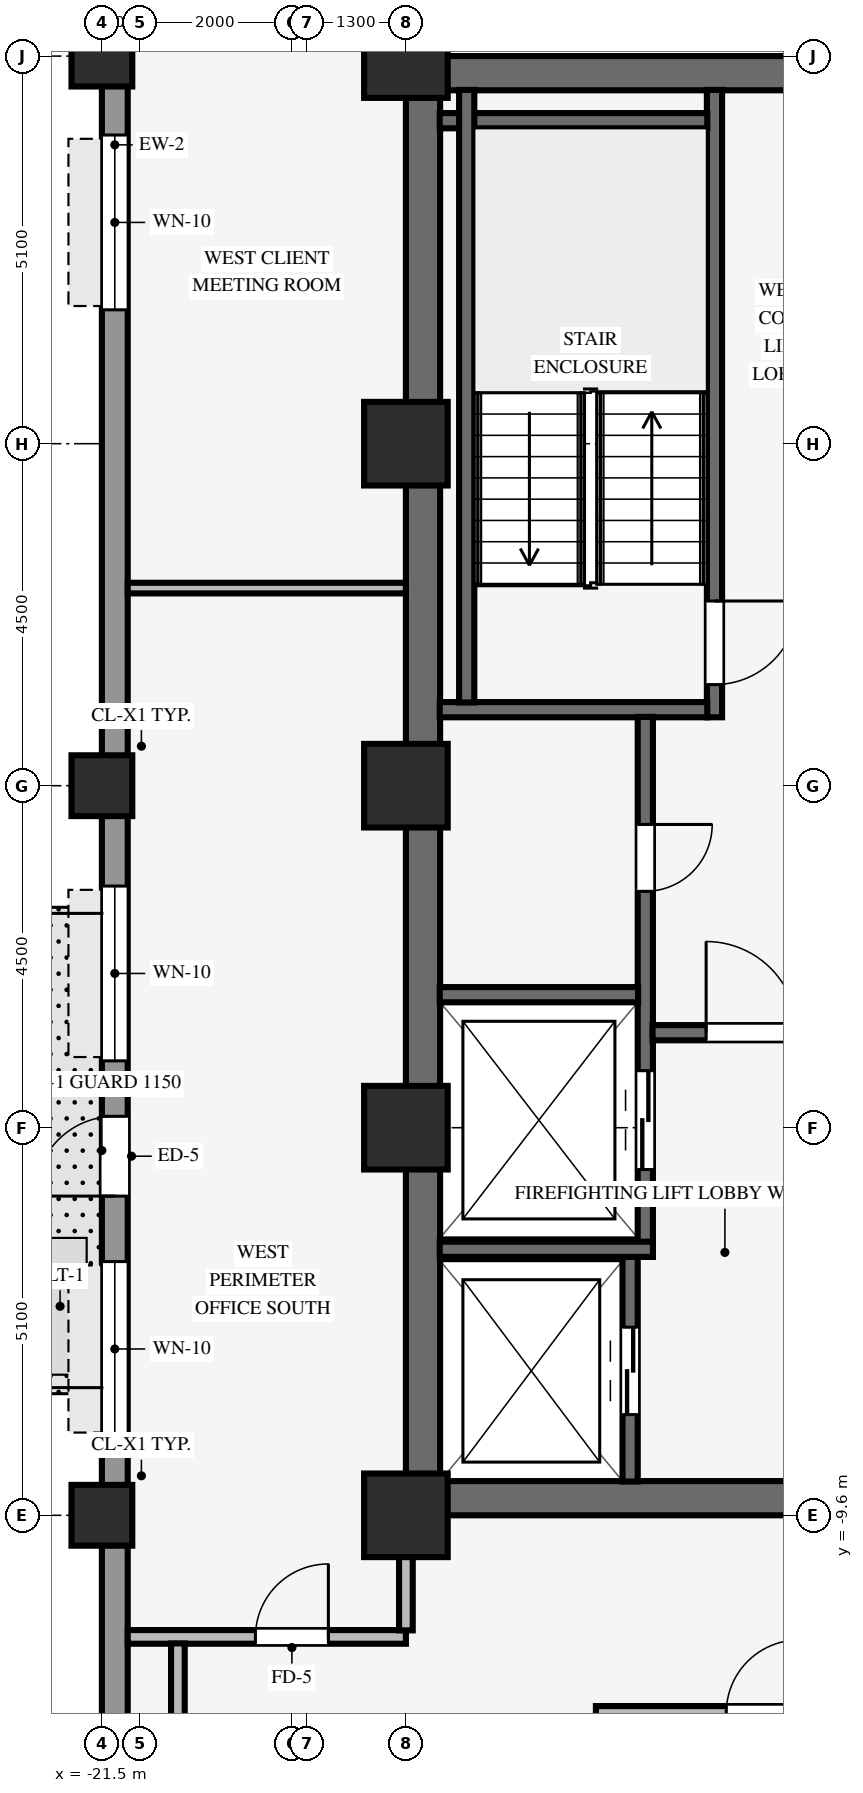
"""IFC4 building model, lengths in metres.
Left out: names, types, materials, properties, quantities, classifications, styles, units other than length and angle.
Written with IfcOpenShell. Run it as: python <this file> out.ifc"""

import sys

from ifc_helpers import new_model, si_unit, direction, frame, frame_2d, origin, origin_2d, place, context, subcontext, project, spatial, rectangle, hollow_rectangle, extrude, source, transform, mapped, element, fill, save


model = new_model("IFC4")
c1 = context("Model", 3, precision=1e-05, world=origin(), true_north=direction((0.0, 1.0)))
c2 = subcontext(c1, "Body", "Model", "MODEL_VIEW")
j1 = project(units=[si_unit("LENGTHUNIT", "METRE"), si_unit("PLANEANGLEUNIT", "RADIAN")], contexts=[c1])
p1 = place(None, origin())
s1 = spatial("IfcSite", under=j1, at=p1, CompositionType="ELEMENT")
p2 = place(p1, origin())
s2 = spatial("IfcBuilding", under=s1, at=p2, CompositionType="ELEMENT")
p3 = place(p2, frame((0.0, 0.0, 64.1)))
s3 = spatial("IfcBuildingStorey", under=s2, at=p3, CompositionType="ELEMENT", Elevation=64.1)
for number, where, z_axis, x_axis in (
    (1, (-17.5, -9.375, 0.0), (0.0, 0.0, 1.0), (1.0, 0.0, 0.0)),
    (2, (-17.5, 9.375, 0.0), (0.0, 0.0, 1.0), (1.0, 0.0, 0.0)),
):
    element("IfcWall", number, at=place(p3, frame(where, z_axis=z_axis, x_axis=x_axis)), inside=s3, PredefinedType="SHEAR", context=c2, shape_type="SweptSolid", body=[
        extrude(rectangle(XDim=8.5, YDim=0.45, at=frame_2d((4.25, 0.0))), origin(), (0.0, 0.0, 1.0), 3.37),
    ])
p4 = place(p3, frame((-17.275, -9.155, 0.0), z_axis=(0.0, 0.0, 1.0), x_axis=(0.0, 1.0, 0.0)))
e3 = element("IfcWall", 3, at=p4, inside=s3, PredefinedType="SHEAR", context=c2, shape_type="SweptSolid", body=[
    extrude(rectangle(XDim=18.31, YDim=0.45, at=frame_2d((9.155, 0.0))), origin(), (0.0, 0.0, 1.0), 3.37),
])
for number, where, z_axis, x_axis in (
    (4, (-17.5, -9.6, 0.0), (0.0, 0.0, 1.0), (1.0, 0.0, 0.0)),
    (5, (-17.5, -4.5, 0.0), (0.0, 0.0, 1.0), (1.0, 0.0, 0.0)),
    (6, (-17.5, 4.5, 0.0), (0.0, 0.0, 1.0), (1.0, 0.0, 0.0)),
    (7, (-17.5, 9.6, 0.0), (0.0, 0.0, 1.0), (1.0, 0.0, 0.0)),
    (8, (-17.5, 0.0, 0.0), (0.0, 0.0, 1.0), (1.0, 0.0, 0.0)),
):
    element("IfcColumn", number, at=place(p3, frame(where, z_axis=z_axis, x_axis=x_axis)), inside=s3, PredefinedType="COLUMN", context=c2, shape_type="SweptSolid", body=[
        extrude(rectangle(XDim=1.1, YDim=1.1, at=origin_2d()), origin(), (0.0, 0.0, 1.0), 3.37),
    ])
for number, where, z_axis, x_axis in (
    (9, (-21.5, -9.6, 0.0), (0.0, 0.0, 1.0), (1.0, 0.0, 0.0)),
    (10, (-21.5, 0.0, 0.0), (0.0, 0.0, 1.0), (1.0, 0.0, 0.0)),
    (11, (-21.5, 9.6, 0.0), (0.0, 0.0, 1.0), (1.0, 0.0, 0.0)),
):
    element("IfcColumn", number, at=place(p3, frame(where, z_axis=z_axis, x_axis=x_axis)), inside=s3, PredefinedType="COLUMN", context=c2, shape_type="SweptSolid", body=[
        extrude(hollow_rectangle(XDim=0.8, YDim=0.8, WallThickness=0.055, InnerFilletRadius=0.055, OuterFilletRadius=0.11, at=origin_2d()), origin(), (0.0, 0.0, 1.0), 3.37),
    ])
p5 = place(p3, frame((-21.33, -20.764, 0.0), z_axis=(0.0, 0.0, 1.0), x_axis=(0.0, 1.0, 0.0)))
e12 = element("IfcWall", 12, at=p5, inside=s3, PredefinedType="STANDARD", context=c2, shape_type="SweptSolid", body=[
    extrude(rectangle(XDim=41.528, YDim=0.34, at=frame_2d((20.764, 0.0))), origin(), (0.0, 0.0, 1.0), 2.705),
])
p6 = place(p5, frame((15.364, 0.0, 0.0)))
e13 = element("IfcOpeningElement", 13, at=p6, cuts=e12, PredefinedType="OPENING", context=c2, shape_type="SweptSolid", body=[
    extrude(rectangle(XDim=1.05, YDim=2.1, at=frame_2d((0.525, 1.05))), frame((0.0, 0.18, 0.0), z_axis=(0.0, -1.0, 0.0), x_axis=(1.0, 0.0, 0.0)), (0.0, 0.0, 1.0), 0.36),
])
p7 = place(p5, frame((12.202, 0.0, 0.8)))
e14 = element("IfcOpeningElement", 14, at=p7, cuts=e12, PredefinedType="OPENING", context=c2, shape_type="SweptSolid", body=[
    extrude(rectangle(XDim=2.3, YDim=1.62, at=frame_2d((1.15, 0.81))), frame((0.0, 0.18, 0.0), z_axis=(0.0, -1.0, 0.0), x_axis=(1.0, 0.0, 0.0)), (0.0, 0.0, 1.0), 0.36),
])
p8 = place(p5, frame((17.144, 0.0, 0.8)))
e15 = element("IfcOpeningElement", 15, at=p8, cuts=e12, PredefinedType="OPENING", context=c2, shape_type="SweptSolid", body=[
    extrude(rectangle(XDim=2.3, YDim=1.62, at=frame_2d((1.15, 0.81))), frame((0.0, 0.18, 0.0), z_axis=(0.0, -1.0, 0.0), x_axis=(1.0, 0.0, 0.0)), (0.0, 0.0, 1.0), 0.36),
])
p9 = place(p5, frame((27.025, 0.0, 0.8)))
e16 = element("IfcOpeningElement", 16, at=p9, cuts=e12, PredefinedType="OPENING", context=c2, shape_type="SweptSolid", body=[
    extrude(rectangle(XDim=2.3, YDim=1.62, at=frame_2d((1.15, 0.81))), frame((0.0, 0.18, 0.0), z_axis=(0.0, -1.0, 0.0), x_axis=(1.0, 0.0, 0.0)), (0.0, 0.0, 1.0), 0.36),
])
p10 = place(p3, frame((-13.44, 0.9, 0.0), z_axis=(0.0, 0.0, 1.0), x_axis=(0.0, 1.0, 0.0)))
e17 = element("IfcWall", 17, at=p10, inside=s3, PredefinedType="SHEAR", context=c2, shape_type="SweptSolid", body=[
    extrude(rectangle(XDim=8.255, YDim=0.2, at=frame_2d((4.127, 0.0))), origin(), (0.0, 0.0, 1.0), 3.37),
])
p11 = place(p10, frame((1.53, 0.0, 0.0), z_axis=(0.0, 0.0, 1.0), x_axis=(-1.0, 0.0, 0.0)))
e18 = element("IfcOpeningElement", 18, at=p11, cuts=e17, PredefinedType="OPENING", context=c2, shape_type="SweptSolid", body=[
    extrude(rectangle(XDim=1.1, YDim=2.15, at=frame_2d((0.55, 1.075))), frame((0.0, 0.11, 0.0), z_axis=(0.0, -1.0, 0.0), x_axis=(1.0, 0.0, 0.0)), (0.0, 0.0, 1.0), 0.22),
])
for number, where, z_axis, x_axis in (
    (19, (-17.055, 1.0, 0.0), (0.0, 0.0, 1.0), (1.0, 0.0, 0.0)),
    (20, (-17.055, 8.75, 0.0), (0.0, 0.0, 1.0), (1.0, 0.0, 0.0)),
):
    element("IfcWall", number, at=place(p3, frame(where, z_axis=z_axis, x_axis=x_axis)), inside=s3, PredefinedType="SHEAR", context=c2, shape_type="SweptSolid", body=[
        extrude(rectangle(XDim=3.52, YDim=0.2, at=frame_2d((1.76, 0.0))), origin(), (0.0, 0.0, 1.0), 3.37),
    ])
p12 = place(p3, frame((-16.7, 1.095, 0.0), z_axis=(0.0, 0.0, 1.0), x_axis=(0.0, 1.0, 0.0)))
e21 = element("IfcWall", 21, at=p12, inside=s3, PredefinedType="SHEAR", context=c2, shape_type="SweptSolid", body=[
    extrude(rectangle(XDim=8.06, YDim=0.2, at=frame_2d((4.03, 0.0))), origin(), (0.0, 0.0, 1.0), 3.37),
])
p13 = place(p3, frame((-14.55, -9.155, 0.0), z_axis=(0.0, 0.0, 1.0), x_axis=(0.0, 1.0, 0.0)))
e22 = element("IfcWall", 22, at=p13, inside=s3, PredefinedType="SHEAR", context=c2, shape_type="SweptSolid", body=[
    extrude(rectangle(XDim=2.96, YDim=0.2, at=frame_2d((1.48, 0.0))), origin(), (0.0, 0.0, 1.0), 3.37),
])
p14 = place(p13, frame((0.88, 0.0, 0.0)))
e23 = element("IfcOpeningElement", 23, at=p14, cuts=e22, PredefinedType="OPENING", context=c2, shape_type="SweptSolid", body=[
    extrude(rectangle(XDim=1.15, YDim=2.15, at=frame_2d((0.575, 1.075))), frame((0.0, 0.11, 0.0), z_axis=(0.0, -1.0, 0.0), x_axis=(1.0, 0.0, 0.0)), (0.0, 0.0, 1.0), 0.22),
])
p15 = place(p3, frame((-14.35, -6.2, 0.0), z_axis=(0.0, 0.0, 1.0), x_axis=(0.0, 1.0, 0.0)))
e24 = element("IfcWall", 24, at=p15, inside=s3, PredefinedType="SHEAR", context=c2, shape_type="SweptSolid", body=[
    extrude(rectangle(XDim=7.105, YDim=0.2, at=frame_2d((3.552, 0.0))), origin(), (0.0, 0.0, 1.0), 3.37),
])
p16 = place(p15, frame((5.69, 0.0, 0.0), z_axis=(0.0, 0.0, 1.0), x_axis=(-1.0, 0.0, 0.0)))
e25 = element("IfcOpeningElement", 25, at=p16, cuts=e24, PredefinedType="OPENING", context=c2, shape_type="SweptSolid", body=[
    extrude(rectangle(XDim=0.88, YDim=2.1, at=frame_2d((0.44, 1.05))), frame((0.0, 0.11, 0.0), z_axis=(0.0, -1.0, 0.0), x_axis=(1.0, 0.0, 0.0)), (0.0, 0.0, 1.0), 0.22),
])
p17 = place(p15, frame((1.15, 0.0, 0.0)))
e26 = element("IfcOpeningElement", 26, at=p17, cuts=e24, PredefinedType="OPENING", context=c2, shape_type="SweptSolid", body=[
    extrude(rectangle(XDim=1.3, YDim=2.2, at=frame_2d((0.65, 1.1))), frame((0.0, 0.11, 0.0), z_axis=(0.0, -1.0, 0.0), x_axis=(1.0, 0.0, 0.0)), (0.0, 0.0, 1.0), 0.22),
])
p18 = place(p3, frame((-17.055, -6.1, 0.0), z_axis=(0.0, 0.0, 1.0), x_axis=(1.0, 0.0, 0.0)))
e27 = element("IfcWall", 27, at=p18, inside=s3, PredefinedType="SHEAR", context=c2, shape_type="SweptSolid", body=[
    extrude(rectangle(XDim=2.805, YDim=0.2, at=frame_2d((1.402, 0.0))), origin(), (0.0, 0.0, 1.0), 3.37),
])
p19 = place(p3, frame((-17.055, -2.75, 0.0), z_axis=(0.0, 0.0, 1.0), x_axis=(1.0, 0.0, 0.0)))
e28 = element("IfcWall", 28, at=p19, inside=s3, PredefinedType="SHEAR", context=c2, shape_type="SweptSolid", body=[
    extrude(rectangle(XDim=2.61, YDim=0.2, at=frame_2d((1.305, 0.0))), origin(), (0.0, 0.0, 1.0), 3.37),
])
p20 = place(p3, frame((-14.255, -3.25, 0.0), z_axis=(0.0, 0.0, 1.0), x_axis=(1.0, 0.0, 0.0)))
e29 = element("IfcWall", 29, at=p20, inside=s3, PredefinedType="SHEAR", context=c2, shape_type="SweptSolid", body=[
    extrude(rectangle(XDim=2.56, YDim=0.2, at=frame_2d((1.28, 0.0))), origin(), (0.0, 0.0, 1.0), 3.37),
])
p21 = place(p20, frame((0.705, 0.0, 0.0)))
e30 = element("IfcOpeningElement", 30, at=p21, cuts=e29, PredefinedType="OPENING", context=c2, shape_type="SweptSolid", body=[
    extrude(rectangle(XDim=1.2, YDim=2.15, at=frame_2d((0.6, 1.075))), frame((0.0, 0.11, 0.0), z_axis=(0.0, -1.0, 0.0), x_axis=(1.0, 0.0, 0.0)), (0.0, 0.0, 1.0), 0.22),
])
p22 = place(p3, frame((-15.0, -12.2, 0.0), z_axis=(0.0, 0.0, 1.0), x_axis=(1.0, 0.0, 0.0)))
e31 = element("IfcWall", 31, at=p22, inside=s3, PredefinedType="PARTITIONING", context=c2, shape_type="SweptSolid", body=[
    extrude(rectangle(XDim=23.8, YDim=0.18, at=frame_2d((11.9, 0.0))), origin(), (0.0, 0.0, 1.0), 3.36),
])
p23 = place(p22, frame((9.31, 0.0, 0.0)))
e32 = element("IfcOpeningElement", 32, at=p23, cuts=e31, PredefinedType="OPENING", context=c2, shape_type="SweptSolid", body=[
    extrude(rectangle(XDim=0.96, YDim=2.1, at=frame_2d((0.48, 1.05))), frame((0.0, 0.1, 0.0), z_axis=(0.0, -1.0, 0.0), x_axis=(1.0, 0.0, 0.0)), (0.0, 0.0, 1.0), 0.2),
])
p24 = place(p22, frame((1.715, 0.0, 0.0)))
e33 = element("IfcOpeningElement", 33, at=p24, cuts=e31, PredefinedType="OPENING", context=c2, shape_type="SweptSolid", body=[
    extrude(rectangle(XDim=0.96, YDim=2.1, at=frame_2d((0.48, 1.05))), frame((0.0, 0.1, 0.0), z_axis=(0.0, -1.0, 0.0), x_axis=(1.0, 0.0, 0.0)), (0.0, 0.0, 1.0), 0.2),
])
p25 = place(p22, frame((5.44, 0.0, 0.0)))
e34 = element("IfcOpeningElement", 34, at=p25, cuts=e31, PredefinedType="OPENING", context=c2, shape_type="SweptSolid", body=[
    extrude(rectangle(XDim=0.96, YDim=2.1, at=frame_2d((0.48, 1.05))), frame((0.0, 0.1, 0.0), z_axis=(0.0, -1.0, 0.0), x_axis=(1.0, 0.0, 0.0)), (0.0, 0.0, 1.0), 0.2),
])
p26 = place(p22, frame((19.65, 0.0, 0.0)))
e35 = element("IfcOpeningElement", 35, at=p26, cuts=e31, PredefinedType="OPENING", context=c2, shape_type="SweptSolid", body=[
    extrude(rectangle(XDim=0.9, YDim=2.1, at=frame_2d((0.45, 1.05))), frame((0.0, 0.1, 0.0), z_axis=(0.0, -1.0, 0.0), x_axis=(1.0, 0.0, 0.0)), (0.0, 0.0, 1.0), 0.2),
])
p27 = place(p22, frame((17.05, 0.0, 0.0)))
e36 = element("IfcOpeningElement", 36, at=p27, cuts=e31, PredefinedType="OPENING", context=c2, shape_type="SweptSolid", body=[
    extrude(rectangle(XDim=0.9, YDim=2.1, at=frame_2d((0.45, 1.05))), frame((0.0, 0.1, 0.0), z_axis=(0.0, -1.0, 0.0), x_axis=(1.0, 0.0, 0.0)), (0.0, 0.0, 1.0), 0.2),
])
p28 = place(p22, frame((22.15, 0.0, 0.0)))
e37 = element("IfcOpeningElement", 37, at=p28, cuts=e31, PredefinedType="OPENING", context=c2, shape_type="SweptSolid", body=[
    extrude(rectangle(XDim=0.9, YDim=2.1, at=frame_2d((0.45, 1.05))), frame((0.0, 0.1, 0.0), z_axis=(0.0, -1.0, 0.0), x_axis=(1.0, 0.0, 0.0)), (0.0, 0.0, 1.0), 0.2),
])
p29 = place(p22, frame((14.72, 0.0, 0.0)))
e38 = element("IfcOpeningElement", 38, at=p29, cuts=e31, PredefinedType="OPENING", context=c2, shape_type="SweptSolid", body=[
    extrude(rectangle(XDim=0.96, YDim=2.1, at=frame_2d((0.48, 1.05))), frame((0.0, 0.1, 0.0), z_axis=(0.0, -1.0, 0.0), x_axis=(1.0, 0.0, 0.0)), (0.0, 0.0, 1.0), 0.2),
])
p30 = place(p3, frame((-21.16, -11.2, 0.0), z_axis=(0.0, 0.0, 1.0), x_axis=(1.0, 0.0, 0.0)))
e39 = element("IfcWall", 39, at=p30, inside=s3, PredefinedType="PARTITIONING", context=c2, shape_type="SweptSolid", body=[
    extrude(rectangle(XDim=3.66, YDim=0.18, at=frame_2d((1.83, 0.0))), origin(), (0.0, 0.0, 1.0), 3.36),
])
p31 = place(p30, frame((1.68, 0.0, 0.0)))
e40 = element("IfcOpeningElement", 40, at=p31, cuts=e39, PredefinedType="OPENING", context=c2, shape_type="SweptSolid", body=[
    extrude(rectangle(XDim=0.96, YDim=2.1, at=frame_2d((0.48, 1.05))), frame((0.0, 0.1, 0.0), z_axis=(0.0, -1.0, 0.0), x_axis=(1.0, 0.0, 0.0)), (0.0, 0.0, 1.0), 0.2),
])
p32 = place(p3, frame((-21.16, 2.6, 0.0), z_axis=(0.0, 0.0, 1.0), x_axis=(1.0, 0.0, 0.0)))
e41 = element("IfcWall", 41, at=p32, inside=s3, PredefinedType="PARTITIONING", context=c2, shape_type="SweptSolid", body=[
    extrude(rectangle(XDim=3.66, YDim=0.14, at=frame_2d((1.83, 0.0))), origin(), (0.0, 0.0, 1.0), 3.36),
])
p33 = place(p3, frame((-20.5, -13.514, 0.0), z_axis=(0.0, 0.0, 1.0), x_axis=(0.0, 1.0, 0.0)))
e42 = element("IfcWall", 42, at=p33, inside=s3, PredefinedType="PARTITIONING", context=c2, shape_type="SweptSolid", body=[
    extrude(rectangle(XDim=2.228, YDim=0.18, at=frame_2d((1.114, 0.0))), origin(), (0.0, 0.0, 1.0), 3.36),
])
p34 = place(p3, frame((-17.5, -11.114, 0.0), z_axis=(0.0, 0.0, 1.0), x_axis=(0.0, 1.0, 0.0)))
e43 = element("IfcWall", 43, at=p34, inside=s3, PredefinedType="PARTITIONING", context=c2, shape_type="SweptSolid", body=[
    extrude(rectangle(XDim=0.968, YDim=0.18, at=frame_2d((0.484, 0.0))), origin(), (0.0, 0.0, 1.0), 2.738),
])
m1 = source(origin(), c2, "Body", "SweptSolid", [
    extrude(rectangle(XDim=1.05, YDim=2.1, at=frame_2d((0.525, 1.05))), frame((0.0, 0.025, 0.0), z_axis=(0.0, -1.0, 0.0), x_axis=(1.0, 0.0, 0.0)), (0.0, 0.0, 1.0), 0.05),
])
p35 = place(p6, origin())
e44 = element("IfcDoor", 44, at=p35, inside=s3, OperationType="SINGLE_SWING_LEFT", PredefinedType="DOOR", context=c2, shape_type="MappedRepresentation", body=[
    mapped(m1, transform((0.0, 0.0, 0.0), scale=1.0)),
])
fill(e13, e44)
m2 = source(origin(), c2, "Body", "SweptSolid", [
    extrude(rectangle(XDim=2.3, YDim=1.62, at=frame_2d((1.15, 0.81))), frame((0.0, 0.03, 0.0), z_axis=(0.0, -1.0, 0.0), x_axis=(1.0, 0.0, 0.0)), (0.0, 0.0, 1.0), 0.06),
])
p36 = place(p7, origin())
e45 = element("IfcWindow", 45, at=p36, inside=s3, PartitioningType="SINGLE_PANEL", PredefinedType="WINDOW", context=c2, shape_type="MappedRepresentation", body=[
    mapped(m2, transform((0.0, 0.0, 0.0), scale=1.0)),
])
fill(e14, e45)
p37 = place(p8, origin())
e46 = element("IfcWindow", 46, at=p37, inside=s3, PartitioningType="SINGLE_PANEL", PredefinedType="WINDOW", context=c2, shape_type="MappedRepresentation", body=[
    mapped(m2, transform((0.0, 0.0, 0.0), scale=1.0)),
])
fill(e15, e46)
p38 = place(p9, origin())
e47 = element("IfcWindow", 47, at=p38, inside=s3, PartitioningType="SINGLE_PANEL", PredefinedType="WINDOW", context=c2, shape_type="MappedRepresentation", body=[
    mapped(m2, transform((0.0, 0.0, 0.0), scale=1.0)),
])
fill(e16, e47)
m3 = source(origin(), c2, "Body", "SweptSolid", [
    extrude(rectangle(XDim=1.1, YDim=2.15, at=frame_2d((0.55, 1.075))), frame((0.0, 0.025, 0.0), z_axis=(0.0, -1.0, 0.0), x_axis=(1.0, 0.0, 0.0)), (0.0, 0.0, 1.0), 0.05),
])
p39 = place(p11, origin())
e48 = element("IfcDoor", 48, at=p39, inside=s3, OperationType="SINGLE_SWING_LEFT", PredefinedType="DOOR", context=c2, shape_type="MappedRepresentation", body=[
    mapped(m3, transform((0.0, 0.0, 0.0), scale=1.0)),
])
fill(e18, e48)
m4 = source(origin(), c2, "Body", "SweptSolid", [
    extrude(rectangle(XDim=0.88, YDim=2.1, at=frame_2d((0.44, 1.05))), frame((0.0, 0.025, 0.0), z_axis=(0.0, -1.0, 0.0), x_axis=(1.0, 0.0, 0.0)), (0.0, 0.0, 1.0), 0.05),
])
p40 = place(p16, origin())
e49 = element("IfcDoor", 49, at=p40, inside=s3, OperationType="SINGLE_SWING_LEFT", PredefinedType="DOOR", context=c2, shape_type="MappedRepresentation", body=[
    mapped(m4, transform((0.0, 0.0, 0.0), scale=1.0)),
])
fill(e25, e49)
m5 = source(origin(), c2, "Body", "SweptSolid", [
    extrude(rectangle(XDim=1.2, YDim=2.15, at=frame_2d((0.6, 1.075))), frame((0.0, 0.025, 0.0), z_axis=(0.0, -1.0, 0.0), x_axis=(1.0, 0.0, 0.0)), (0.0, 0.0, 1.0), 0.05),
])
p41 = place(p21, origin())
e50 = element("IfcDoor", 50, at=p41, inside=s3, OperationType="SINGLE_SWING_LEFT", PredefinedType="DOOR", context=c2, shape_type="MappedRepresentation", body=[
    mapped(m5, transform((0.0, 0.0, 0.0), scale=1.0)),
])
fill(e30, e50)
m6 = source(origin(), c2, "Body", "SweptSolid", [
    extrude(rectangle(XDim=1.15, YDim=2.15, at=frame_2d((0.575, 1.075))), frame((0.0, 0.025, 0.0), z_axis=(0.0, -1.0, 0.0), x_axis=(1.0, 0.0, 0.0)), (0.0, 0.0, 1.0), 0.05),
])
p42 = place(p14, origin())
e51 = element("IfcDoor", 51, at=p42, inside=s3, OperationType="DOUBLE_DOOR_SLIDING", PredefinedType="DOOR", context=c2, shape_type="MappedRepresentation", body=[
    mapped(m6, transform((0.0, 0.0, 0.0), scale=1.0)),
])
fill(e23, e51)
m7 = source(origin(), c2, "Body", "SweptSolid", [
    extrude(rectangle(XDim=1.3, YDim=2.2, at=frame_2d((0.65, 1.1))), frame((0.0, 0.025, 0.0), z_axis=(0.0, -1.0, 0.0), x_axis=(1.0, 0.0, 0.0)), (0.0, 0.0, 1.0), 0.05),
])
p43 = place(p17, origin())
e52 = element("IfcDoor", 52, at=p43, inside=s3, OperationType="DOUBLE_DOOR_SLIDING", PredefinedType="DOOR", context=c2, shape_type="MappedRepresentation", body=[
    mapped(m7, transform((0.0, 0.0, 0.0), scale=1.0)),
])
fill(e26, e52)
m8 = source(origin(), c2, "Body", "SweptSolid", [
    extrude(rectangle(XDim=0.96, YDim=2.1, at=frame_2d((0.48, 1.05))), frame((0.0, 0.025, 0.0), z_axis=(0.0, -1.0, 0.0), x_axis=(1.0, 0.0, 0.0)), (0.0, 0.0, 1.0), 0.05),
])
p44 = place(p24, origin())
e53 = element("IfcDoor", 53, at=p44, inside=s3, OperationType="SINGLE_SWING_RIGHT", PredefinedType="DOOR", context=c2, shape_type="MappedRepresentation", body=[
    mapped(m8, transform((0.0, 0.0, 0.0), scale=1.0)),
])
fill(e33, e53)
p45 = place(p31, origin())
e54 = element("IfcDoor", 54, at=p45, inside=s3, OperationType="SINGLE_SWING_RIGHT", PredefinedType="DOOR", context=c2, shape_type="MappedRepresentation", body=[
    mapped(m8, transform((0.0, 0.0, 0.0), scale=1.0)),
])
fill(e40, e54)
save(model, sys.argv[1])
